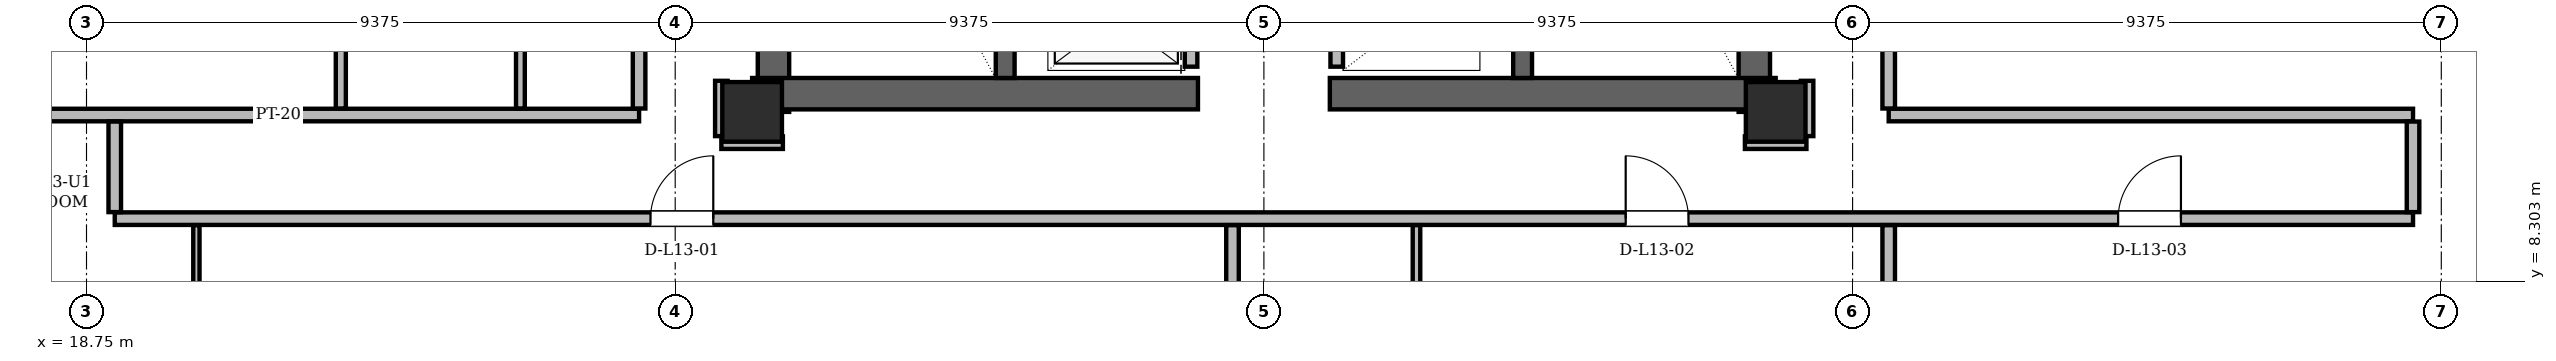
"""IFC4 building model, lengths in metres.
Left out: names, types, materials, properties, quantities, classifications, styles, units other than length and angle.
Written with IfcOpenShell. Run it as: python <this file> out.ifc"""

import sys

from ifc_helpers import new_model, si_unit, direction, frame, frame_2d, origin, origin_2d, place, context, subcontext, project, spatial, rectangle, hollow_rectangle, extrude, element, fill, save


model = new_model("IFC4")
c1 = context("Model", 3, precision=1e-05, world=origin(), true_north=direction((0.0, 1.0)))
c2 = subcontext(c1, "Body", "Model", "MODEL_VIEW")
j1 = project(units=[si_unit("LENGTHUNIT", "METRE"), si_unit("PLANEANGLEUNIT", "RADIAN")], contexts=[c1])
p1 = place(None, origin())
s1 = spatial("IfcSite", under=j1, at=p1, CompositionType="ELEMENT")
p2 = place(p1, origin())
s2 = spatial("IfcBuilding", under=s1, at=p2, CompositionType="ELEMENT")
p3 = place(p2, frame((0.0, 0.0, 52.5)))
s3 = spatial("IfcBuildingStorey", under=s2, at=p3, CompositionType="ELEMENT", Elevation=52.5)
for number, where, z_axis, x_axis in (
    (1, (29.35, 11.0, 0.0), (0.0, 0.0, 1.0), (1.0, 0.0, 0.0)),
    (2, (45.65, 11.0, 0.0), (0.0, 0.0, 1.0), (1.0, 0.0, 0.0)),
):
    element("IfcColumn", number, at=place(p3, frame(where, z_axis=z_axis, x_axis=x_axis)), inside=s3, PredefinedType="COLUMN", context=c2, shape_type="SweptSolid", body=[
        extrude(hollow_rectangle(XDim=0.95, YDim=0.95, WallThickness=0.08, at=origin_2d()), origin(), (0.0, 0.0, 1.0), 3.6),
    ])
for number, where, z_axis, x_axis in (
    (3, (29.69, 11.0, 0.0), (0.0, 0.0, 1.0), (0.0, 1.0, 0.0)),
    (4, (45.31, 11.0, 0.0), (0.0, 0.0, 1.0), (0.0, 1.0, 0.0)),
):
    element("IfcWall", number, at=place(p3, frame(where, z_axis=z_axis, x_axis=x_axis)), inside=s3, PredefinedType="SHEAR", context=c2, shape_type="SweptSolid", body=[
        extrude(rectangle(XDim=13.3, YDim=0.5, at=frame_2d((6.65, 0.0))), origin(), (0.0, 0.0, 1.0), 3.36),
    ])
for number, where, z_axis, x_axis in (
    (5, (29.35, 11.29, 0.0), (0.0, 0.0, 1.0), (1.0, 0.0, 0.0)),
    (6, (38.55, 11.29, 0.0), (0.0, 0.0, 1.0), (1.0, 0.0, 0.0)),
):
    element("IfcWall", number, at=place(p3, frame(where, z_axis=z_axis, x_axis=x_axis)), inside=s3, PredefinedType="SHEAR", context=c2, shape_type="SweptSolid", body=[
        extrude(rectangle(XDim=7.1, YDim=0.5, at=frame_2d((3.55, 0.0))), origin(), (0.0, 0.0, 1.0), 3.36),
    ])
for number, where, z_axis, x_axis in (
    (7, (33.38, 11.54, 0.0), (0.0, 0.0, 1.0), (0.0, 1.0, 0.0)),
    (8, (41.62, 11.54, 0.0), (0.0, 0.0, 1.0), (0.0, 1.0, 0.0)),
):
    element("IfcWall", number, at=place(p3, frame(where, z_axis=z_axis, x_axis=x_axis)), inside=s3, PredefinedType="SHEAR", context=c2, shape_type="SweptSolid", body=[
        extrude(rectangle(XDim=7.62, YDim=0.3, at=frame_2d((3.81, 0.0))), origin(), (0.0, 0.0, 1.0), 3.36),
    ])
p4 = place(p3, frame((13.542, 14.648, 0.0), z_axis=(0.0, 0.0, 1.0), x_axis=(0.49999957979, -0.866025646392, 0.0)))
e9 = element("IfcWall", 9, at=p4, inside=s3, PredefinedType="SOLIDWALL", context=c2, shape_type="SweptSolid", body=[
    extrude(rectangle(XDim=14.515, YDim=0.34, at=frame_2d((7.257, 0.0))), origin(), (0.0, 0.0, 1.0), 2.494),
])
p5 = place(p4, frame((3.15, 0.0, 0.85)))
e10 = element("IfcOpeningElement", 10, at=p5, cuts=e9, PredefinedType="OPENING", context=c2, shape_type="SweptSolid", body=[
    extrude(rectangle(XDim=1.2, YDim=1.48, at=frame_2d((0.6, 0.74))), frame((0.0, 0.17, 0.0), z_axis=(0.0, -1.0, 0.0), x_axis=(1.0, 0.0, 0.0)), (0.0, 0.0, 1.0), 0.34),
])
p6 = place(p3, frame((54.201, 2.078, 0.0), z_axis=(0.0, 0.0, 1.0), x_axis=(0.49999957979, 0.866025646392, 0.0)))
e11 = element("IfcWall", 11, at=p6, inside=s3, PredefinedType="SOLIDWALL", context=c2, shape_type="SweptSolid", body=[
    extrude(rectangle(XDim=14.515, YDim=0.34, at=frame_2d((7.257, 0.0))), origin(), (0.0, 0.0, 1.0), 2.494),
])
p7 = place(p3, frame((36.34, 11.72, 0.0), z_axis=(0.0, 0.0, 1.0), x_axis=(0.0, 1.0, 0.0)))
e12 = element("IfcWall", 12, at=p7, inside=s3, PredefinedType="PARTITIONING", context=c2, shape_type="SweptSolid", body=[
    extrude(rectangle(XDim=7.6, YDim=0.2, at=frame_2d((3.8, 0.0))), origin(), (0.0, 0.0, 1.0), 3.36),
])
p8 = place(p7, frame((0.255, 0.0, 0.0)))
e13 = element("IfcOpeningElement", 13, at=p8, cuts=e12, PredefinedType="OPENING", context=c2, shape_type="SweptSolid", body=[
    extrude(rectangle(XDim=1.05, YDim=2.15, at=frame_2d((0.525, 1.075))), frame((0.0, 0.1, 0.0), z_axis=(0.0, -1.0, 0.0), x_axis=(1.0, 0.0, 0.0)), (0.0, 0.0, 1.0), 0.2),
])
p9 = place(p7, frame((2.105, 0.0, 0.0)))
e14 = element("IfcOpeningElement", 14, at=p9, cuts=e12, PredefinedType="OPENING", context=c2, shape_type="SweptSolid", body=[
    extrude(rectangle(XDim=1.05, YDim=2.15, at=frame_2d((0.525, 1.075))), frame((0.0, 0.1, 0.0), z_axis=(0.0, -1.0, 0.0), x_axis=(1.0, 0.0, 0.0)), (0.0, 0.0, 1.0), 0.2),
])
p10 = place(p7, frame((3.955, 0.0, 0.0)))
e15 = element("IfcOpeningElement", 15, at=p10, cuts=e12, PredefinedType="OPENING", context=c2, shape_type="SweptSolid", body=[
    extrude(rectangle(XDim=1.05, YDim=2.15, at=frame_2d((0.525, 1.075))), frame((0.0, 0.1, 0.0), z_axis=(0.0, -1.0, 0.0), x_axis=(1.0, 0.0, 0.0)), (0.0, 0.0, 1.0), 0.2),
])
p11 = place(p3, frame((38.66, 11.72, 0.0), z_axis=(0.0, 0.0, 1.0), x_axis=(0.0, 1.0, 0.0)))
e16 = element("IfcWall", 16, at=p11, inside=s3, PredefinedType="PARTITIONING", context=c2, shape_type="SweptSolid", body=[
    extrude(rectangle(XDim=9.1, YDim=0.2, at=frame_2d((4.55, 0.0))), origin(), (0.0, 0.0, 1.0), 3.36),
])
p12 = place(p3, frame((19.2, 9.3, 0.0), z_axis=(0.0, 0.0, 1.0), x_axis=(1.0, 0.0, 0.0)))
e17 = element("IfcWall", 17, at=p12, inside=s3, PredefinedType="PARTITIONING", context=c2, shape_type="SweptSolid", body=[
    extrude(rectangle(XDim=36.6, YDim=0.2, at=frame_2d((18.3, 0.0))), origin(), (0.0, 0.0, 1.0), 2.738),
])
p13 = place(p12, frame((8.531, 0.0, 0.0)))
e18 = element("IfcOpeningElement", 18, at=p13, cuts=e17, PredefinedType="OPENING", context=c2, shape_type="SweptSolid", body=[
    extrude(rectangle(XDim=1.0, YDim=2.18, at=frame_2d((0.5, 1.09))), frame((0.0, 0.1, 0.0), z_axis=(0.0, -1.0, 0.0), x_axis=(1.0, 0.0, 0.0)), (0.0, 0.0, 1.0), 0.2),
])
p14 = place(p12, frame((24.062, 0.0, 0.0)))
e19 = element("IfcOpeningElement", 19, at=p14, cuts=e17, PredefinedType="OPENING", context=c2, shape_type="SweptSolid", body=[
    extrude(rectangle(XDim=1.0, YDim=2.18, at=frame_2d((0.5, 1.09))), frame((0.0, 0.1, 0.0), z_axis=(0.0, -1.0, 0.0), x_axis=(1.0, 0.0, 0.0)), (0.0, 0.0, 1.0), 0.2),
])
p15 = place(p12, frame((31.904, 0.0, 0.0)))
e20 = element("IfcOpeningElement", 20, at=p15, cuts=e17, PredefinedType="OPENING", context=c2, shape_type="SweptSolid", body=[
    extrude(rectangle(XDim=1.0, YDim=2.18, at=frame_2d((0.5, 1.09))), frame((0.0, 0.1, 0.0), z_axis=(0.0, -1.0, 0.0), x_axis=(1.0, 0.0, 0.0)), (0.0, 0.0, 1.0), 0.2),
])
for number, where, z_axis, x_axis in (
    (21, (28.86, 10.51, 0.0), (0.0, 0.0, 1.0), (1.0, 0.0, 0.0)),
    (22, (45.16, 10.51, 0.0), (0.0, 0.0, 1.0), (1.0, 0.0, 0.0)),
):
    element("IfcWall", number, at=place(p3, frame(where, z_axis=z_axis, x_axis=x_axis)), inside=s3, PredefinedType="PARTITIONING", context=c2, shape_type="SweptSolid", body=[
        extrude(rectangle(XDim=0.98, YDim=0.2, at=frame_2d((0.49, 0.0))), origin(), (0.0, 0.0, 1.0), 2.738),
    ])
p16 = place(p3, frame((15.878, 10.95, 0.0), z_axis=(0.0, 0.0, 1.0), x_axis=(1.0, 0.0, 0.0)))
e23 = element("IfcWall", 23, at=p16, inside=s3, PredefinedType="PARTITIONING", context=c2, shape_type="SweptSolid", body=[
    extrude(rectangle(XDim=11.672, YDim=0.2, at=frame_2d((5.836, 0.0))), origin(), (0.0, 0.0, 1.0), 3.36),
])
p17 = place(p3, frame((47.45, 10.95, 0.0), z_axis=(0.0, 0.0, 1.0), x_axis=(1.0, 0.0, 0.0)))
e24 = element("IfcWall", 24, at=p17, inside=s3, PredefinedType="PARTITIONING", context=c2, shape_type="SweptSolid", body=[
    extrude(rectangle(XDim=8.35, YDim=0.2, at=frame_2d((4.175, 0.0))), origin(), (0.0, 0.0, 1.0), 3.36),
])
p18 = place(p3, frame((19.2, 9.404, 0.0), z_axis=(0.0, 0.0, 1.0), x_axis=(0.0, 1.0, 0.0)))
e25 = element("IfcWall", 25, at=p18, inside=s3, PredefinedType="PARTITIONING", context=c2, shape_type="SweptSolid", body=[
    extrude(rectangle(XDim=1.442, YDim=0.2, at=frame_2d((0.721, 0.0))), origin(), (0.0, 0.0, 1.0), 3.36),
])
p19 = place(p3, frame((20.5, 2.944, 0.0), z_axis=(0.0, 0.0, 1.0), x_axis=(0.0, 1.0, 0.0)))
e26 = element("IfcWall", 26, at=p19, inside=s3, PredefinedType="PARTITIONING", context=c2, shape_type="SweptSolid", body=[
    extrude(rectangle(XDim=6.252, YDim=0.1, at=frame_2d((3.126, 0.0))), origin(), (0.0, 0.0, 1.0), 3.36),
])
p20 = place(p19, frame((2.709, 0.0, 0.0)))
e27 = element("IfcOpeningElement", 27, at=p20, cuts=e26, PredefinedType="OPENING", context=c2, shape_type="SweptSolid", body=[
    extrude(rectangle(XDim=0.88, YDim=2.08, at=frame_2d((0.44, 1.04))), frame((0.0, 0.05, 0.0), z_axis=(0.0, -1.0, 0.0), x_axis=(1.0, 0.0, 0.0)), (0.0, 0.0, 1.0), 0.1),
])
p21 = place(p3, frame((22.8, 11.054, 0.0), z_axis=(0.0, 0.0, 1.0), x_axis=(0.0, 1.0, 0.0)))
e28 = element("IfcWall", 28, at=p21, inside=s3, PredefinedType="PARTITIONING", context=c2, shape_type="SweptSolid", body=[
    extrude(rectangle(XDim=3.562, YDim=0.16, at=frame_2d((1.781, 0.0))), origin(), (0.0, 0.0, 1.0), 2.738),
])
p22 = place(p3, frame((25.66, 11.054, 0.0), z_axis=(0.0, 0.0, 1.0), x_axis=(0.0, 1.0, 0.0)))
e29 = element("IfcWall", 29, at=p22, inside=s3, PredefinedType="PARTITIONING", context=c2, shape_type="SweptSolid", body=[
    extrude(rectangle(XDim=3.562, YDim=0.14, at=frame_2d((1.781, 0.0))), origin(), (0.0, 0.0, 1.0), 2.738),
])
p23 = place(p3, frame((27.55, 11.054, 0.0), z_axis=(0.0, 0.0, 1.0), x_axis=(0.0, 1.0, 0.0)))
e30 = element("IfcWall", 30, at=p23, inside=s3, PredefinedType="PARTITIONING", context=c2, shape_type="SweptSolid", body=[
    extrude(rectangle(XDim=14.812, YDim=0.2, at=frame_2d((7.406, 0.0))), origin(), (0.0, 0.0, 1.0), 2.738),
])
p24 = place(p23, frame((7.932, 0.0, 0.0)))
e31 = element("IfcOpeningElement", 31, at=p24, cuts=e30, PredefinedType="OPENING", context=c2, shape_type="SweptSolid", body=[
    extrude(rectangle(XDim=1.0, YDim=2.18, at=frame_2d((0.5, 1.09))), frame((0.0, 0.1, 0.0), z_axis=(0.0, -1.0, 0.0), x_axis=(1.0, 0.0, 0.0)), (0.0, 0.0, 1.0), 0.2),
])
p25 = place(p3, frame((28.86, 10.614, 0.0), z_axis=(0.0, 0.0, 1.0), x_axis=(0.0, 1.0, 0.0)))
e32 = element("IfcWall", 32, at=p25, inside=s3, PredefinedType="PARTITIONING", context=c2, shape_type="SweptSolid", body=[
    extrude(rectangle(XDim=0.881, YDim=0.2, at=frame_2d((0.44, 0.0))), origin(), (0.0, 0.0, 1.0), 2.738),
])
p26 = place(p3, frame((37.0, 2.252, 0.0), z_axis=(0.0, 0.0, 1.0), x_axis=(0.0, 1.0, 0.0)))
e33 = element("IfcWall", 33, at=p26, inside=s3, PredefinedType="PARTITIONING", context=c2, shape_type="SweptSolid", body=[
    extrude(rectangle(XDim=6.944, YDim=0.2, at=frame_2d((3.472, 0.0))), origin(), (0.0, 0.0, 1.0), 3.36),
])
p27 = place(p3, frame((39.93, 2.252, 0.0), z_axis=(0.0, 0.0, 1.0), x_axis=(0.0, 1.0, 0.0)))
e34 = element("IfcWall", 34, at=p27, inside=s3, PredefinedType="PARTITIONING", context=c2, shape_type="SweptSolid", body=[
    extrude(rectangle(XDim=6.944, YDim=0.12, at=frame_2d((3.472, 0.0))), origin(), (0.0, 0.0, 1.0), 3.36),
])
p28 = place(p27, frame((3.072, 0.0, 0.0)))
e35 = element("IfcOpeningElement", 35, at=p28, cuts=e34, PredefinedType="OPENING", context=c2, shape_type="SweptSolid", body=[
    extrude(rectangle(XDim=0.88, YDim=2.08, at=frame_2d((0.44, 1.04))), frame((0.0, 0.06, 0.0), z_axis=(0.0, -1.0, 0.0), x_axis=(1.0, 0.0, 0.0)), (0.0, 0.0, 1.0), 0.12),
])
p29 = place(p3, frame((46.15, 10.614, 0.0), z_axis=(0.0, 0.0, 1.0), x_axis=(0.0, 1.0, 0.0)))
e36 = element("IfcWall", 36, at=p29, inside=s3, PredefinedType="PARTITIONING", context=c2, shape_type="SweptSolid", body=[
    extrude(rectangle(XDim=0.881, YDim=0.2, at=frame_2d((0.44, 0.0))), origin(), (0.0, 0.0, 1.0), 2.738),
])
p30 = place(p3, frame((47.45, 2.252, 0.0), z_axis=(0.0, 0.0, 1.0), x_axis=(0.0, 1.0, 0.0)))
e37 = element("IfcWall", 37, at=p30, inside=s3, PredefinedType="PARTITIONING", context=c2, shape_type="SweptSolid", body=[
    extrude(rectangle(XDim=6.944, YDim=0.2, at=frame_2d((3.472, 0.0))), origin(), (0.0, 0.0, 1.0), 2.738),
])
p31 = place(p3, frame((47.45, 11.054, 0.0), z_axis=(0.0, 0.0, 1.0), x_axis=(0.0, 1.0, 0.0)))
e38 = element("IfcWall", 38, at=p31, inside=s3, PredefinedType="PARTITIONING", context=c2, shape_type="SweptSolid", body=[
    extrude(rectangle(XDim=27.509, YDim=0.2, at=frame_2d((13.754, 0.0))), origin(), (0.0, 0.0, 1.0), 2.494),
])
p32 = place(p31, frame((10.989, 0.0, 0.0)))
e39 = element("IfcOpeningElement", 39, at=p32, cuts=e38, PredefinedType="OPENING", context=c2, shape_type="SweptSolid", body=[
    extrude(rectangle(XDim=1.0, YDim=2.18, at=frame_2d((0.5, 1.09))), frame((0.0, 0.1, 0.0), z_axis=(0.0, -1.0, 0.0), x_axis=(1.0, 0.0, 0.0)), (0.0, 0.0, 1.0), 0.2),
])
p33 = place(p3, frame((55.8, 9.404, 0.0), z_axis=(0.0, 0.0, 1.0), x_axis=(0.0, 1.0, 0.0)))
e40 = element("IfcWall", 40, at=p33, inside=s3, PredefinedType="PARTITIONING", context=c2, shape_type="SweptSolid", body=[
    extrude(rectangle(XDim=1.442, YDim=0.2, at=frame_2d((0.721, 0.0))), origin(), (0.0, 0.0, 1.0), 3.36),
])
p34 = place(p13, origin())
e41 = element("IfcDoor", 41, at=p34, inside=s3, OperationType="SINGLE_SWING_RIGHT", PredefinedType="DOOR", context=c2, shape_type="SweptSolid", body=[
    extrude(rectangle(XDim=1.0, YDim=2.18, at=frame_2d((0.5, 1.09))), frame((0.0, 0.025, 0.0), z_axis=(0.0, -1.0, 0.0), x_axis=(1.0, 0.0, 0.0)), (0.0, 0.0, 1.0), 0.05),
])
fill(e18, e41)
p35 = place(p14, origin())
e42 = element("IfcDoor", 42, at=p35, inside=s3, OperationType="SINGLE_SWING_LEFT", PredefinedType="DOOR", context=c2, shape_type="SweptSolid", body=[
    extrude(rectangle(XDim=1.0, YDim=2.18, at=frame_2d((0.5, 1.09))), frame((0.0, 0.025, 0.0), z_axis=(0.0, -1.0, 0.0), x_axis=(1.0, 0.0, 0.0)), (0.0, 0.0, 1.0), 0.05),
])
fill(e19, e42)
p36 = place(p15, origin())
e43 = element("IfcDoor", 43, at=p36, inside=s3, OperationType="SINGLE_SWING_RIGHT", PredefinedType="DOOR", context=c2, shape_type="SweptSolid", body=[
    extrude(rectangle(XDim=1.0, YDim=2.18, at=frame_2d((0.5, 1.09))), frame((0.0, 0.025, 0.0), z_axis=(0.0, -1.0, 0.0), x_axis=(1.0, 0.0, 0.0)), (0.0, 0.0, 1.0), 0.05),
])
fill(e20, e43)
save(model, sys.argv[1])
